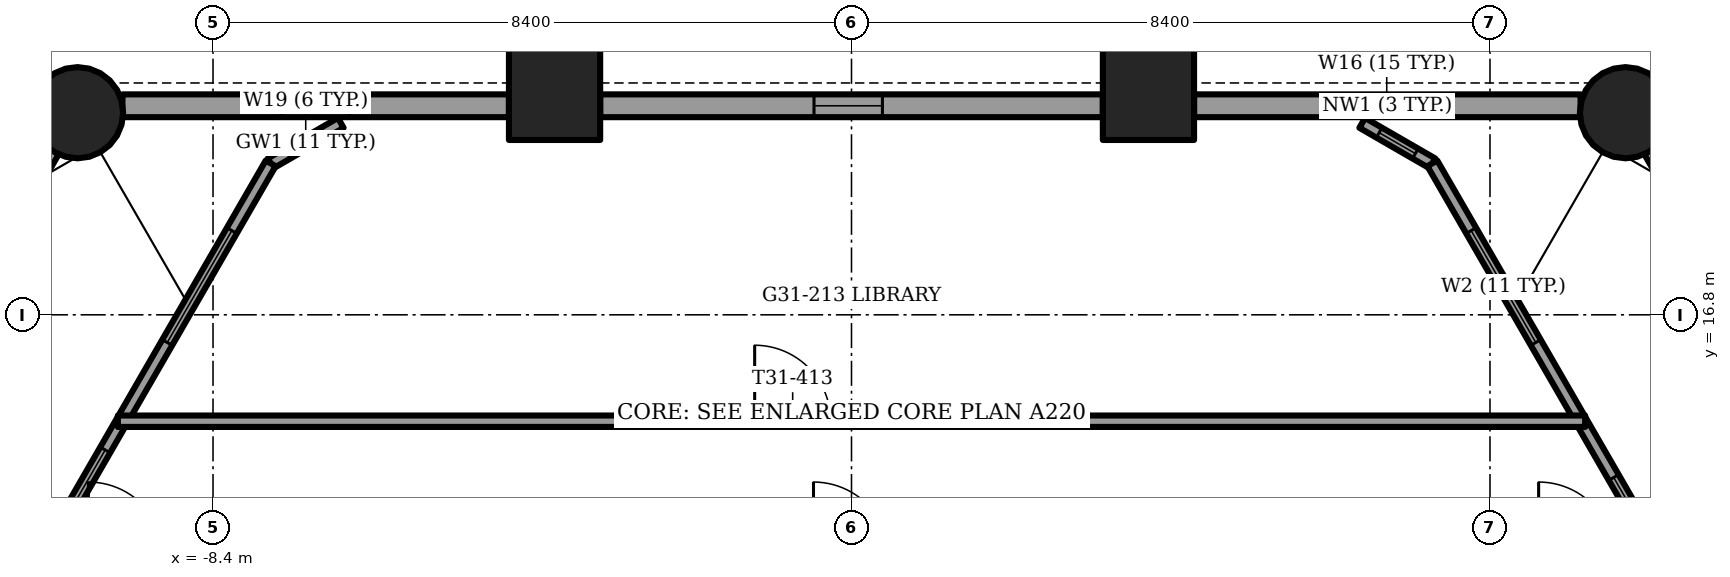
"""IFC4 building model, lengths in metres.
Left out: names, types, materials, properties, quantities, classifications, styles, units other than length and angle.
Written with IfcOpenShell. Run it as: python <this file> out.ifc"""

import sys

from ifc_helpers import new_model, si_unit, direction, frame, frame_2d, origin, origin_2d, place, context, subcontext, project, spatial, rectangle, circle, extrude, element, fill, save


model = new_model("IFC4")
c1 = context("Model", 3, precision=1e-05, world=origin(), true_north=direction((0.0, 1.0)))
c2 = subcontext(c1, "Body", "Model", "MODEL_VIEW")
j1 = project(units=[si_unit("LENGTHUNIT", "METRE"), si_unit("PLANEANGLEUNIT", "RADIAN")], contexts=[c1])
p1 = place(None, origin())
s1 = spatial("IfcSite", under=j1, at=p1, CompositionType="ELEMENT")
p2 = place(p1, origin())
s2 = spatial("IfcBuilding", under=s1, at=p2, CompositionType="ELEMENT")
p3 = place(p2, frame((0.0, 0.0, 127.25)))
s3 = spatial("IfcBuildingStorey", under=s2, at=p3, CompositionType="ELEMENT", Elevation=127.25)
for number, where, z_axis, x_axis in (
    (1, (-10.183, 19.459, -1.2), (0.0, 0.0, 1.0), (1.0, 0.0, 0.0)),
    (2, (10.183, 19.459, -1.2), (0.0, 0.0, 1.0), (1.0, 0.0, 0.0)),
):
    element("IfcColumn", number, at=place(p3, frame(where, z_axis=z_axis, x_axis=x_axis)), inside=s3, PredefinedType="COLUMN", context=c2, shape_type="SweptSolid", body=[
        extrude(circle(Radius=0.6, at=origin_2d()), origin(), (0.0, 0.0, 1.0), 3.75),
    ])
for number, where, z_axis, x_axis in (
    (3, (3.907, 19.7, -1.2), (0.0, 0.0, 1.0), (1.0, 0.0, 0.0)),
    (4, (-3.907, 19.7, -1.2), (0.0, 0.0, 1.0), (1.0, 0.0, 0.0)),
):
    element("IfcColumn", number, at=place(p3, frame(where, z_axis=z_axis, x_axis=x_axis)), inside=s3, PredefinedType="COLUMN", context=c2, shape_type="SweptSolid", body=[
        extrude(rectangle(XDim=1.2, YDim=1.2, at=origin_2d()), origin(), (0.0, 0.0, 1.0), 3.75),
    ])
for number, where, z_axis, x_axis in (
    (5, (-10.734, 19.286, 0.0), (0.0, 0.0, 1.0), (-0.5, -0.866, 0.0)),
    (6, (14.163, 13.346, 0.0), (0.0, 0.0, 1.0), (-0.5, 0.866, 0.0)),
):
    element("IfcWall", number, at=place(p3, frame(where, z_axis=z_axis, x_axis=x_axis)), inside=s3, PredefinedType="PARAPET", context=c2, shape_type="SweptSolid", body=[
        extrude(rectangle(XDim=6.859, YDim=0.9, at=frame_2d((3.429, 0.0))), origin(), (0.0, 0.0, 1.0), 1.1),
    ])
p4 = place(p3, frame((9.592, 19.55, 0.0), z_axis=(0.0, 0.0, 1.0), x_axis=(-1.0, 0.0, 0.0)))
e7 = element("IfcWall", 7, at=p4, inside=s3, PredefinedType="SOLIDWALL", context=c2, shape_type="SweptSolid", body=[
    extrude(rectangle(XDim=5.085, YDim=0.3, at=frame_2d((2.542, 0.0))), origin(), (0.0, 0.0, 1.0), 2.55),
])
p5 = place(p4, frame((2.1, 0.0, 0.15)))
e8 = element("IfcOpeningElement", 8, at=p5, cuts=e7, PredefinedType="OPENING", context=c2, shape_type="SweptSolid", body=[
    extrude(rectangle(XDim=0.9, YDim=2.15, at=frame_2d((0.45, 1.075))), frame((0.0, 0.15, 0.0), z_axis=(0.0, -1.0, 0.0), x_axis=(1.0, 0.0, 0.0)), (0.0, 0.0, 1.0), 0.3),
])
p6 = place(p3, frame((3.307, 19.55, 0.0), z_axis=(0.0, 0.0, 1.0), x_axis=(-1.0, 0.0, 0.0)))
e9 = element("IfcWall", 9, at=p6, inside=s3, PredefinedType="SOLIDWALL", context=c2, shape_type="SweptSolid", body=[
    extrude(rectangle(XDim=6.613, YDim=0.3, at=frame_2d((3.307, 0.0))), origin(), (0.0, 0.0, 1.0), 2.55),
])
p7 = place(p6, frame((2.9, 0.0, 0.15)))
e10 = element("IfcOpeningElement", 10, at=p7, cuts=e9, PredefinedType="OPENING", context=c2, shape_type="SweptSolid", body=[
    extrude(rectangle(XDim=0.9, YDim=2.15, at=frame_2d((0.45, 1.075))), frame((0.0, 0.15, 0.0), z_axis=(0.0, -1.0, 0.0), x_axis=(1.0, 0.0, 0.0)), (0.0, 0.0, 1.0), 0.3),
])
p8 = place(p3, frame((-4.507, 19.55, 0.0), z_axis=(0.0, 0.0, 1.0), x_axis=(-1.0, 0.0, 0.0)))
e11 = element("IfcWall", 11, at=p8, inside=s3, PredefinedType="SOLIDWALL", context=c2, shape_type="SweptSolid", body=[
    extrude(rectangle(XDim=5.085, YDim=0.3, at=frame_2d((2.542, 0.0))), origin(), (0.0, 0.0, 1.0), 2.55),
])
p9 = place(p8, frame((2.1, 0.0, 0.15)))
e12 = element("IfcOpeningElement", 12, at=p9, cuts=e11, PredefinedType="OPENING", context=c2, shape_type="SweptSolid", body=[
    extrude(rectangle(XDim=0.9, YDim=2.15, at=frame_2d((0.45, 1.075))), frame((0.0, 0.15, 0.0), z_axis=(0.0, -1.0, 0.0), x_axis=(1.0, 0.0, 0.0)), (0.0, 0.0, 1.0), 0.3),
])
p10 = place(p3, frame((-7.642, 18.792, 0.0), z_axis=(0.0, 0.0, 1.0), x_axis=(-0.500001219746, -0.866024699562, 0.0)))
e13 = element("IfcWall", 13, at=p10, inside=s3, PredefinedType="SOLIDWALL", context=c2, shape_type="SweptSolid", body=[
    extrude(rectangle(XDim=22.137, YDim=0.15, at=frame_2d((11.068, 0.0))), origin(), (0.0, 0.0, 1.0), 3.45),
])
p11 = place(p10, frame((4.354, 0.0, 0.15)))
e14 = element("IfcOpeningElement", 14, at=p11, cuts=e13, PredefinedType="OPENING", context=c2, shape_type="SweptSolid", body=[
    extrude(rectangle(XDim=0.9, YDim=2.85, at=frame_2d((0.45, 1.425))), frame((0.0, 0.075, 0.0), z_axis=(0.0, -1.0, 0.0), x_axis=(1.0, 0.0, 0.0)), (0.0, 0.0, 1.0), 0.15),
])
p12 = place(p10, frame((6.454, 0.0, 0.15)))
e15 = element("IfcOpeningElement", 15, at=p12, cuts=e13, PredefinedType="OPENING", context=c2, shape_type="SweptSolid", body=[
    extrude(rectangle(XDim=1.5, YDim=2.85, at=frame_2d((0.75, 1.425))), frame((0.0, 0.075, 0.0), z_axis=(0.0, -1.0, 0.0), x_axis=(1.0, 0.0, 0.0)), (0.0, 0.0, 1.0), 0.15),
])
p13 = place(p10, frame((8.554, 0.0, 0.15)))
e16 = element("IfcOpeningElement", 16, at=p13, cuts=e13, PredefinedType="OPENING", context=c2, shape_type="SweptSolid", body=[
    extrude(rectangle(XDim=0.9, YDim=2.85, at=frame_2d((0.45, 1.425))), frame((0.0, 0.075, 0.0), z_axis=(0.0, -1.0, 0.0), x_axis=(1.0, 0.0, 0.0)), (0.0, 0.0, 1.0), 0.15),
])
p14 = place(p10, frame((12.754, 0.0, 0.15)))
e17 = element("IfcOpeningElement", 17, at=p14, cuts=e13, PredefinedType="OPENING", context=c2, shape_type="SweptSolid", body=[
    extrude(rectangle(XDim=0.9, YDim=2.85, at=frame_2d((0.45, 1.425))), frame((0.0, 0.075, 0.0), z_axis=(0.0, -1.0, 0.0), x_axis=(1.0, 0.0, 0.0)), (0.0, 0.0, 1.0), 0.15),
])
p15 = place(p10, frame((14.449, 0.0, 0.15)))
e18 = element("IfcOpeningElement", 18, at=p15, cuts=e13, PredefinedType="OPENING", context=c2, shape_type="SweptSolid", body=[
    extrude(rectangle(XDim=1.5, YDim=2.85, at=frame_2d((0.75, 1.425))), frame((0.0, 0.075, 0.0), z_axis=(0.0, -1.0, 0.0), x_axis=(1.0, 0.0, 0.0)), (0.0, 0.0, 1.0), 0.15),
])
p16 = place(p10, frame((16.954, 0.0, 0.15)))
e19 = element("IfcOpeningElement", 19, at=p16, cuts=e13, PredefinedType="OPENING", context=c2, shape_type="SweptSolid", body=[
    extrude(rectangle(XDim=1.7, YDim=2.85, at=frame_2d((0.85, 1.425))), frame((0.0, 0.075, 0.0), z_axis=(0.0, -1.0, 0.0), x_axis=(1.0, 0.0, 0.0)), (0.0, 0.0, 1.0), 0.15),
])
p17 = place(p10, frame((19.054, 0.0, 0.0)))
e20 = element("IfcOpeningElement", 20, at=p17, cuts=e13, PredefinedType="OPENING", context=c2, shape_type="SweptSolid", body=[
    extrude(rectangle(XDim=1.5, YDim=2.4, at=frame_2d((0.75, 1.2))), frame((0.0, 0.075, 0.0), z_axis=(0.0, -1.0, 0.0), x_axis=(1.0, 0.0, 0.0)), (0.0, 0.0, 1.0), 0.15),
])
p18 = place(p10, frame((1.021, 0.0, 0.15)))
e21 = element("IfcOpeningElement", 21, at=p18, cuts=e13, PredefinedType="OPENING", context=c2, shape_type="SweptSolid", body=[
    extrude(rectangle(XDim=1.7, YDim=2.73, at=frame_2d((0.85, 1.365))), frame((0.0, 0.075, 0.0), z_axis=(0.0, -1.0, 0.0), x_axis=(1.0, 0.0, 0.0)), (0.0, 0.0, 1.0), 0.15),
])
p19 = place(p3, frame((18.71, -0.378, 0.0), z_axis=(0.0, 0.0, 1.0), x_axis=(-0.500001219746, 0.866024699562, 0.0)))
e22 = element("IfcWall", 22, at=p19, inside=s3, PredefinedType="SOLIDWALL", context=c2, shape_type="SweptSolid", body=[
    extrude(rectangle(XDim=22.137, YDim=0.15, at=frame_2d((11.068, 0.0))), origin(), (0.0, 0.0, 1.0), 3.45),
])
p20 = place(p19, frame((1.583, 0.0, 0.15)))
e23 = element("IfcOpeningElement", 23, at=p20, cuts=e22, PredefinedType="OPENING", context=c2, shape_type="SweptSolid", body=[
    extrude(rectangle(XDim=1.7, YDim=2.85, at=frame_2d((0.85, 1.425))), frame((0.0, 0.075, 0.0), z_axis=(0.0, -1.0, 0.0), x_axis=(1.0, 0.0, 0.0)), (0.0, 0.0, 1.0), 0.15),
])
p21 = place(p19, frame((3.438, 0.0, 0.0)))
e24 = element("IfcOpeningElement", 24, at=p21, cuts=e22, PredefinedType="OPENING", context=c2, shape_type="SweptSolid", body=[
    extrude(rectangle(XDim=1.5, YDim=2.4, at=frame_2d((0.75, 1.2))), frame((0.0, 0.075, 0.0), z_axis=(0.0, -1.0, 0.0), x_axis=(1.0, 0.0, 0.0)), (0.0, 0.0, 1.0), 0.15),
])
p22 = place(p19, frame((6.188, 0.0, 0.15)))
e25 = element("IfcOpeningElement", 25, at=p22, cuts=e22, PredefinedType="OPENING", context=c2, shape_type="SweptSolid", body=[
    extrude(rectangle(XDim=0.9, YDim=2.85, at=frame_2d((0.45, 1.425))), frame((0.0, 0.075, 0.0), z_axis=(0.0, -1.0, 0.0), x_axis=(1.0, 0.0, 0.0)), (0.0, 0.0, 1.0), 0.15),
])
p23 = place(p19, frame((7.883, 0.0, 0.15)))
e26 = element("IfcOpeningElement", 26, at=p23, cuts=e22, PredefinedType="OPENING", context=c2, shape_type="SweptSolid", body=[
    extrude(rectangle(XDim=1.5, YDim=2.85, at=frame_2d((0.75, 1.425))), frame((0.0, 0.075, 0.0), z_axis=(0.0, -1.0, 0.0), x_axis=(1.0, 0.0, 0.0)), (0.0, 0.0, 1.0), 0.15),
])
p24 = place(p19, frame((12.481, 0.0, 0.15)))
e27 = element("IfcOpeningElement", 27, at=p24, cuts=e22, PredefinedType="OPENING", context=c2, shape_type="SweptSolid", body=[
    extrude(rectangle(XDim=0.9, YDim=2.85, at=frame_2d((0.45, 1.425))), frame((0.0, 0.075, 0.0), z_axis=(0.0, -1.0, 0.0), x_axis=(1.0, 0.0, 0.0)), (0.0, 0.0, 1.0), 0.15),
])
p25 = place(p19, frame((10.281, 0.0, 0.15)))
e28 = element("IfcOpeningElement", 28, at=p25, cuts=e22, PredefinedType="OPENING", context=c2, shape_type="SweptSolid", body=[
    extrude(rectangle(XDim=1.5, YDim=2.85, at=frame_2d((0.75, 1.425))), frame((0.0, 0.075, 0.0), z_axis=(0.0, -1.0, 0.0), x_axis=(1.0, 0.0, 0.0)), (0.0, 0.0, 1.0), 0.15),
])
p26 = place(p19, frame((16.465, 0.0, 0.15)))
e29 = element("IfcOpeningElement", 29, at=p26, cuts=e22, PredefinedType="OPENING", context=c2, shape_type="SweptSolid", body=[
    extrude(rectangle(XDim=0.9, YDim=2.85, at=frame_2d((0.45, 1.425))), frame((0.0, 0.075, 0.0), z_axis=(0.0, -1.0, 0.0), x_axis=(1.0, 0.0, 0.0)), (0.0, 0.0, 1.0), 0.15),
])
p27 = place(p19, frame((14.265, 0.0, 0.15)))
e30 = element("IfcOpeningElement", 30, at=p27, cuts=e22, PredefinedType="OPENING", context=c2, shape_type="SweptSolid", body=[
    extrude(rectangle(XDim=1.5, YDim=2.85, at=frame_2d((0.75, 1.425))), frame((0.0, 0.075, 0.0), z_axis=(0.0, -1.0, 0.0), x_axis=(1.0, 0.0, 0.0)), (0.0, 0.0, 1.0), 0.15),
])
p28 = place(p19, frame((19.415, 0.0, 0.15)))
e31 = element("IfcOpeningElement", 31, at=p28, cuts=e22, PredefinedType="OPENING", context=c2, shape_type="SweptSolid", body=[
    extrude(rectangle(XDim=1.7, YDim=2.73, at=frame_2d((0.85, 1.365))), frame((0.0, 0.075, 0.0), z_axis=(0.0, -1.0, 0.0), x_axis=(1.0, 0.0, 0.0)), (0.0, 0.0, 1.0), 0.15),
])
p29 = place(p3, frame((-6.719, 19.325, 0.0), z_axis=(0.0, 0.0, 1.0), x_axis=(-0.866048165231, -0.499960573946, 0.0)))
e32 = element("IfcWall", 32, at=p29, inside=s3, PredefinedType="SOLIDWALL", context=c2, shape_type="SweptSolid", body=[
    extrude(rectangle(XDim=1.065, YDim=0.15, at=frame_2d((0.532, 0.0))), origin(), (0.0, 0.0, 1.0), 3.45),
])
p30 = place(p29, frame((0.258, 0.0, 0.15)))
e33 = element("IfcOpeningElement", 33, at=p30, cuts=e32, PredefinedType="OPENING", context=c2, shape_type="SweptSolid", body=[
    extrude(rectangle(XDim=0.55, YDim=2.85, at=frame_2d((0.275, 1.425))), frame((0.0, 0.075, 0.0), z_axis=(0.0, -1.0, 0.0), x_axis=(1.0, 0.0, 0.0)), (0.0, 0.0, 1.0), 0.15),
])
p31 = place(p3, frame((7.642, 18.792, 0.0), z_axis=(0.0, 0.0, 1.0), x_axis=(-0.866048165231, 0.499960573946, 0.0)))
e34 = element("IfcWall", 34, at=p31, inside=s3, PredefinedType="SOLIDWALL", context=c2, shape_type="SweptSolid", body=[
    extrude(rectangle(XDim=1.065, YDim=0.15, at=frame_2d((0.532, 0.0))), origin(), (0.0, 0.0, 1.0), 3.45),
])
p32 = place(p31, frame((0.258, 0.0, 0.15)))
e35 = element("IfcOpeningElement", 35, at=p32, cuts=e34, PredefinedType="OPENING", context=c2, shape_type="SweptSolid", body=[
    extrude(rectangle(XDim=0.55, YDim=2.85, at=frame_2d((0.275, 1.425))), frame((0.0, 0.075, 0.0), z_axis=(0.0, -1.0, 0.0), x_axis=(1.0, 0.0, 0.0)), (0.0, 0.0, 1.0), 0.15),
])
p33 = place(p3, frame((-9.652, 15.4, 0.0), z_axis=(0.0, 0.0, 1.0), x_axis=(1.0, 0.0, 0.0)))
e36 = element("IfcWall", 36, at=p33, inside=s3, PredefinedType="PARTITIONING", context=c2, shape_type="SweptSolid", body=[
    extrude(rectangle(XDim=19.304, YDim=0.15, at=frame_2d((9.652, 0.0))), origin(), (0.0, 0.0, 1.0), 3.45),
])
p34 = place(p33, frame((8.378, 0.0, 0.0)))
e37 = element("IfcOpeningElement", 37, at=p34, cuts=e36, PredefinedType="OPENING", context=c2, shape_type="SweptSolid", body=[
    extrude(rectangle(XDim=1.0, YDim=2.1, at=frame_2d((0.5, 1.05))), frame((0.0, 0.075, 0.0), z_axis=(0.0, -1.0, 0.0), x_axis=(1.0, 0.0, 0.0)), (0.0, 0.0, 1.0), 0.15),
])
p35 = place(p5, origin())
e38 = element("IfcWindow", 38, at=p35, inside=s3, PartitioningType="SINGLE_PANEL", PredefinedType="WINDOW", context=c2, shape_type="SweptSolid", body=[
    extrude(rectangle(XDim=0.9, YDim=2.15, at=frame_2d((0.45, 1.075))), frame((0.0, 0.03, 0.0), z_axis=(0.0, -1.0, 0.0), x_axis=(1.0, 0.0, 0.0)), (0.0, 0.0, 1.0), 0.06),
])
fill(e8, e38)
p36 = place(p7, origin())
e39 = element("IfcWindow", 39, at=p36, inside=s3, PartitioningType="SINGLE_PANEL", PredefinedType="WINDOW", context=c2, shape_type="SweptSolid", body=[
    extrude(rectangle(XDim=0.9, YDim=2.15, at=frame_2d((0.45, 1.075))), frame((0.0, 0.03, 0.0), z_axis=(0.0, -1.0, 0.0), x_axis=(1.0, 0.0, 0.0)), (0.0, 0.0, 1.0), 0.06),
])
fill(e10, e39)
p37 = place(p9, origin())
e40 = element("IfcWindow", 40, at=p37, inside=s3, PartitioningType="SINGLE_PANEL", PredefinedType="WINDOW", context=c2, shape_type="SweptSolid", body=[
    extrude(rectangle(XDim=0.9, YDim=2.15, at=frame_2d((0.45, 1.075))), frame((0.0, 0.03, 0.0), z_axis=(0.0, -1.0, 0.0), x_axis=(1.0, 0.0, 0.0)), (0.0, 0.0, 1.0), 0.06),
])
fill(e12, e40)
p38 = place(p11, origin())
e41 = element("IfcWindow", 41, at=p38, inside=s3, PartitioningType="SINGLE_PANEL", PredefinedType="WINDOW", context=c2, shape_type="SweptSolid", body=[
    extrude(rectangle(XDim=0.9, YDim=2.85, at=frame_2d((0.45, 1.425))), frame((0.0, 0.03, 0.0), z_axis=(0.0, -1.0, 0.0), x_axis=(1.0, 0.0, 0.0)), (0.0, 0.0, 1.0), 0.06),
])
fill(e14, e41)
p39 = place(p18, origin())
e42 = element("IfcWindow", 42, at=p39, inside=s3, PartitioningType="SINGLE_PANEL", PredefinedType="WINDOW", context=c2, shape_type="SweptSolid", body=[
    extrude(rectangle(XDim=1.7, YDim=2.73, at=frame_2d((0.85, 1.365))), frame((0.0, 0.03, 0.0), z_axis=(0.0, -1.0, 0.0), x_axis=(1.0, 0.0, 0.0)), (0.0, 0.0, 1.0), 0.06),
])
fill(e21, e42)
p40 = place(p26, origin())
e43 = element("IfcWindow", 43, at=p40, inside=s3, PartitioningType="SINGLE_PANEL", PredefinedType="WINDOW", context=c2, shape_type="SweptSolid", body=[
    extrude(rectangle(XDim=0.9, YDim=2.85, at=frame_2d((0.45, 1.425))), frame((0.0, 0.03, 0.0), z_axis=(0.0, -1.0, 0.0), x_axis=(1.0, 0.0, 0.0)), (0.0, 0.0, 1.0), 0.06),
])
fill(e29, e43)
p41 = place(p28, origin())
e44 = element("IfcWindow", 44, at=p41, inside=s3, PartitioningType="SINGLE_PANEL", PredefinedType="WINDOW", context=c2, shape_type="SweptSolid", body=[
    extrude(rectangle(XDim=1.7, YDim=2.73, at=frame_2d((0.85, 1.365))), frame((0.0, 0.03, 0.0), z_axis=(0.0, -1.0, 0.0), x_axis=(1.0, 0.0, 0.0)), (0.0, 0.0, 1.0), 0.06),
])
fill(e31, e44)
p42 = place(p30, origin())
e45 = element("IfcWindow", 45, at=p42, inside=s3, PartitioningType="SINGLE_PANEL", PredefinedType="WINDOW", context=c2, shape_type="SweptSolid", body=[
    extrude(rectangle(XDim=0.55, YDim=2.85, at=frame_2d((0.275, 1.425))), frame((0.0, 0.03, 0.0), z_axis=(0.0, -1.0, 0.0), x_axis=(1.0, 0.0, 0.0)), (0.0, 0.0, 1.0), 0.06),
])
fill(e33, e45)
p43 = place(p32, origin())
e46 = element("IfcWindow", 46, at=p43, inside=s3, PartitioningType="SINGLE_PANEL", PredefinedType="WINDOW", context=c2, shape_type="SweptSolid", body=[
    extrude(rectangle(XDim=0.55, YDim=2.85, at=frame_2d((0.275, 1.425))), frame((0.0, 0.03, 0.0), z_axis=(0.0, -1.0, 0.0), x_axis=(1.0, 0.0, 0.0)), (0.0, 0.0, 1.0), 0.06),
])
fill(e35, e46)
p44 = place(p34, origin())
e47 = element("IfcDoor", 47, at=p44, inside=s3, OperationType="SINGLE_SWING_LEFT", PredefinedType="DOOR", context=c2, shape_type="SweptSolid", body=[
    extrude(rectangle(XDim=1.0, YDim=2.1, at=frame_2d((0.5, 1.05))), frame((0.0, 0.025, 0.0), z_axis=(0.0, -1.0, 0.0), x_axis=(1.0, 0.0, 0.0)), (0.0, 0.0, 1.0), 0.05),
])
fill(e37, e47)
save(model, sys.argv[1])
